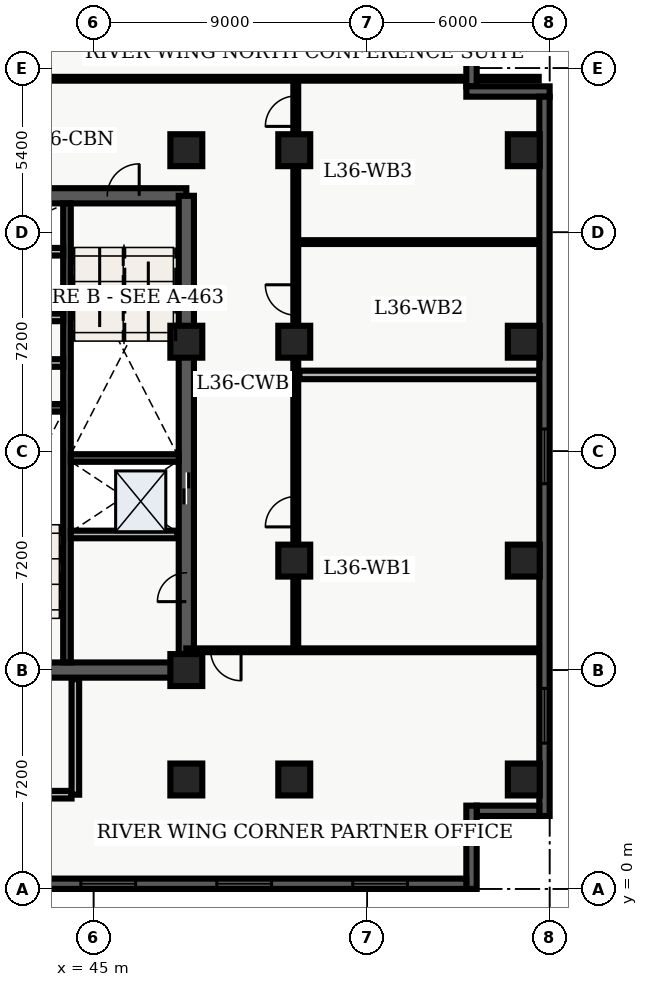
"""IFC4 building model, lengths in metres.
Left out: names, types, materials, properties, quantities, classifications, styles, units other than length and angle.
Written with IfcOpenShell. Run it as: python <this file> out.ifc"""

import sys

from ifc_helpers import new_model, entity, si_unit, converted_unit, direction, frame, origin_with_axes, origin_2d_with_axis, place, context, subcontext, project, spatial, polyline, rectangle, outline, extrude, element, fill, save


model = new_model("IFC4")
c1 = context("Model", 3, precision=1e-05, world=origin_with_axes(), true_north=direction((0.0, 1.0)))
c2 = subcontext(c1, "Body", "Model", "MODEL_VIEW")
j1 = project(units=[si_unit("LENGTHUNIT", "METRE"), converted_unit("PLANEANGLEUNIT", "DEGREE", entity("IfcPlaneAngleMeasure", 0.017), si_unit("PLANEANGLEUNIT", "RADIAN"), dimensions=[0, 0, 0, 0, 0, 0, 0])], contexts=[c1])
p1 = place(None, origin_with_axes())
s1 = spatial("IfcSite", under=j1, at=p1, CompositionType="ELEMENT")
p2 = place(p1, origin_with_axes())
s2 = spatial("IfcBuilding", under=s1, at=p2, CompositionType="ELEMENT")
p3 = place(p2, frame((0.0, 0.0, 148.5), z_axis=(0.0, 0.0, 1.0), x_axis=(1.0, 0.0, 0.0)))
s3 = spatial("IfcBuildingStorey", under=s2, at=p3, CompositionType="ELEMENT", Elevation=148.5)
p4 = place(p3, frame((40.2, 7.2, 0.0), z_axis=(0.0, 0.0, 1.0), x_axis=(1.0, 0.0, 0.0)))
e1 = element("IfcWall", 1, at=p4, inside=s3, PredefinedType="SHEAR", context=c2, shape_type="SweptSolid", body=[
    extrude(outline(polyline([(0.0, -0.25), (7.85, -0.25), (7.85, 0.25), (0.0, 0.25), (0.0, -0.25)])), origin_with_axes(), (0.0, 0.0, 1.0), 3.66),
])
p5 = place(p4, frame((2.175, 0.0, 0.0), z_axis=(0.0, 0.0, 1.0), x_axis=(1.0, 0.0, 0.0)))
e2 = element("IfcOpeningElement", 2, at=p5, cuts=e1, PredefinedType="OPENING", context=c2, shape_type="SweptSolid", body=[
    extrude(rectangle(XDim=1.05, YDim=0.52, at=origin_2d_with_axis()), origin_with_axes(), (0.0, 0.0, 1.0), 2.15),
])
p6 = place(p3, frame((40.2, 22.8, 0.0), z_axis=(0.0, 0.0, 1.0), x_axis=(1.0, 0.0, 0.0)))
e3 = element("IfcWall", 3, at=p6, inside=s3, PredefinedType="SHEAR", context=c2, shape_type="SweptSolid", body=[
    extrude(outline(polyline([(0.0, -0.25), (7.85, -0.25), (7.85, 0.25), (0.0, 0.25), (0.0, -0.25)])), origin_with_axes(), (0.0, 0.0, 1.0), 3.66),
])
p7 = place(p6, frame((5.775, 0.0, 0.0), z_axis=(0.0, 0.0, 1.0), x_axis=(1.0, 0.0, 0.0)))
e4 = element("IfcOpeningElement", 4, at=p7, cuts=e3, PredefinedType="OPENING", context=c2, shape_type="SweptSolid", body=[
    extrude(rectangle(XDim=1.05, YDim=0.52, at=origin_2d_with_axis()), origin_with_axes(), (0.0, 0.0, 1.0), 2.15),
])
p8 = place(p3, frame((48.05, 7.2, 0.0), z_axis=(0.0, 0.0, 1.0), x_axis=(0.0, 1.0, 0.0)))
e5 = element("IfcWall", 5, at=p8, inside=s3, PredefinedType="SHEAR", context=c2, shape_type="SweptSolid", body=[
    extrude(outline(polyline([(0.0, -0.25), (15.6, -0.25), (15.6, 0.25), (0.0, 0.25), (0.0, -0.25)])), origin_with_axes(), (0.0, 0.0, 1.0), 3.66),
])
p9 = place(p8, frame((5.975, 0.0, 0.0), z_axis=(0.0, 0.0, 1.0), x_axis=(1.0, 0.0, 0.0)))
e6 = element("IfcOpeningElement", 6, at=p9, cuts=e5, PredefinedType="OPENING", context=c2, shape_type="SweptSolid", body=[
    extrude(rectangle(XDim=1.05, YDim=0.52, at=origin_2d_with_axis()), origin_with_axes(), (0.0, 0.0, 1.0), 2.15),
])
p10 = place(p8, frame((2.725, 0.0, 0.0), z_axis=(0.0, 0.0, 1.0), x_axis=(1.0, 0.0, 0.0)))
e7 = element("IfcOpeningElement", 7, at=p10, cuts=e5, PredefinedType="OPENING", context=c2, shape_type="SweptSolid", body=[
    extrude(rectangle(XDim=0.95, YDim=0.52, at=origin_2d_with_axis()), origin_with_axes(), (0.0, 0.0, 1.0), 2.15),
])
p11 = place(p3, frame((44.125, 7.45, 0.0), z_axis=(0.0, 0.0, 1.0), x_axis=(0.0, 1.0, 0.0)))
e8 = element("IfcWall", 8, at=p11, inside=s3, PredefinedType="SHEAR", context=c2, shape_type="SweptSolid", body=[
    extrude(outline(polyline([(0.0, -0.125), (15.1, -0.125), (15.1, 0.125), (0.0, 0.125), (0.0, -0.125)])), origin_with_axes(), (0.0, 0.0, 1.0), 3.66),
])
for number, where, z_axis, x_axis in (
    (9, (40.45, 15.825, 0.0), (0.0, 0.0, 1.0), (1.0, 0.0, 0.0)),
    (10, (44.25, 14.175, 0.0), (0.0, 0.0, 1.0), (1.0, 0.0, 0.0)),
):
    element("IfcWall", number, at=place(p3, frame(where, z_axis=z_axis, x_axis=x_axis)), inside=s3, PredefinedType="SHEAR", context=c2, shape_type="SweptSolid", body=[
        extrude(outline(polyline([(0.0, -0.125), (3.55, -0.125), (3.55, 0.125), (0.0, 0.125), (0.0, -0.125)])), origin_with_axes(), (0.0, 0.0, 1.0), 3.66),
    ])
p12 = place(p3, frame((40.5, 17.3, 0.0), z_axis=(0.0, 0.0, 1.0), x_axis=(1.0, 0.0, 0.0)))
e11 = element("IfcWall", 11, at=p12, inside=s3, PredefinedType="SOLIDWALL", context=c2, shape_type="SweptSolid", body=[
    extrude(outline(polyline([(0.0, -0.125), (3.5, -0.125), (3.5, 0.125), (0.0, 0.125), (0.0, -0.125)])), origin_with_axes(), (0.0, 0.0, 1.0), 2.7),
])
p13 = place(p12, frame((2.4, 0.0, 0.0), z_axis=(0.0, 0.0, 1.0), x_axis=(1.0, 0.0, 0.0)))
e12 = element("IfcOpeningElement", 12, at=p13, cuts=e11, PredefinedType="OPENING", context=c2, shape_type="SweptSolid", body=[
    extrude(rectangle(XDim=0.9, YDim=0.27, at=origin_2d_with_axis()), origin_with_axes(), (0.0, 0.0, 1.0), 2.15),
])
p14 = place(p3, frame((40.5, 18.8, 0.0), z_axis=(0.0, 0.0, 1.0), x_axis=(1.0, 0.0, 0.0)))
e13 = element("IfcWall", 13, at=p14, inside=s3, PredefinedType="SOLIDWALL", context=c2, shape_type="SweptSolid", body=[
    extrude(outline(polyline([(0.0, -0.125), (3.5, -0.125), (3.5, 0.125), (0.0, 0.125), (0.0, -0.125)])), origin_with_axes(), (0.0, 0.0, 1.0), 2.7),
])
p15 = place(p3, frame((40.325, 3.1, 0.0), z_axis=(0.0, 0.0, 1.0), x_axis=(1.0, 0.0, 0.0)))
e14 = element("IfcWall", 14, at=p15, inside=s3, PredefinedType="SOLIDWALL", context=c2, shape_type="SweptSolid", body=[
    extrude(outline(polyline([(0.0, -0.125), (3.95, -0.125), (3.95, 0.125), (0.0, 0.125), (0.0, -0.125)])), origin_with_axes(), (0.0, 0.0, 1.0), 2.7),
])
p16 = place(p3, frame((44.4, 3.1, 0.0), z_axis=(0.0, 0.0, 1.0), x_axis=(0.0, 1.0, 0.0)))
e15 = element("IfcWall", 15, at=p16, inside=s3, PredefinedType="SOLIDWALL", context=c2, shape_type="SweptSolid", body=[
    extrude(outline(polyline([(0.0, -0.125), (3.8, -0.125), (3.8, 0.125), (0.0, 0.125), (0.0, -0.125)])), origin_with_axes(), (0.0, 0.0, 1.0), 2.7),
])
for number, where, z_axis, x_axis in (
    (16, (48.05, 3.6, 0.0), (0.0, 0.0, 1.0), (1.0, 0.0, 0.0)),
    (17, (48.05, 7.2, 0.0), (0.0, 0.0, 1.0), (1.0, 0.0, 0.0)),
    (18, (48.05, 18.0, 0.0), (0.0, 0.0, 1.0), (1.0, 0.0, 0.0)),
    (19, (48.05, 24.3, 0.0), (0.0, 0.0, 1.0), (1.0, 0.0, 0.0)),
    (20, (51.6, 3.6, 0.0), (0.0, 0.0, 1.0), (1.0, 0.0, 0.0)),
    (21, (51.6, 10.8, 0.0), (0.0, 0.0, 1.0), (1.0, 0.0, 0.0)),
    (22, (51.6, 18.0, 0.0), (0.0, 0.0, 1.0), (1.0, 0.0, 0.0)),
    (23, (51.6, 24.3, 0.0), (0.0, 0.0, 1.0), (1.0, 0.0, 0.0)),
    (24, (59.15, 3.6, 0.0), (0.0, 0.0, 1.0), (1.0, 0.0, 0.0)),
    (25, (59.15, 10.8, 0.0), (0.0, 0.0, 1.0), (1.0, 0.0, 0.0)),
    (26, (59.15, 18.0, 0.0), (0.0, 0.0, 1.0), (1.0, 0.0, 0.0)),
    (27, (59.15, 24.3, 0.0), (0.0, 0.0, 1.0), (1.0, 0.0, 0.0)),
):
    element("IfcColumn", number, at=place(p3, frame(where, z_axis=z_axis, x_axis=x_axis)), inside=s3, PredefinedType="COLUMN", context=c2, shape_type="SweptSolid", body=[
        extrude(rectangle(XDim=1.05, YDim=1.05, at=origin_2d_with_axis()), origin_with_axes(), (0.0, 0.0, 1.0), 3.9),
    ])
for number, where, z_axis, x_axis in (
    (28, (40.5, 20.96, 0.0), (0.0, 0.0, 1.0), (1.0, 0.0, 0.0)),
    (29, (44.25, 11.66, 0.0), (0.0, 0.0, 1.0), (1.0, 0.0, 0.0)),
):
    element("IfcWall", number, at=place(p3, frame(where, z_axis=z_axis, x_axis=x_axis)), inside=s3, PredefinedType="SOLIDWALL", context=c2, shape_type="SweptSolid", body=[
        extrude(outline(polyline([(0.0, -0.125), (3.5, -0.125), (3.5, 0.125), (0.0, 0.125), (0.0, -0.125)])), origin_with_axes(), (0.0, 0.0, 1.0), 2.7),
    ])
p17 = place(p3, frame((51.65, 7.85, 0.0), z_axis=(0.0, 0.0, 1.0), x_axis=(0.0, 1.0, 0.0)))
e30 = element("IfcWall", 30, at=p17, inside=s3, PredefinedType="PARTITIONING", context=c2, shape_type="SweptSolid", body=[
    extrude(outline(polyline([(0.0, -0.08), (18.8, -0.08), (18.8, 0.08), (0.0, 0.08), (0.0, -0.08)])), origin_with_axes(), (0.0, 0.0, 1.0), 2.7),
])
p18 = place(p17, frame((4.559, 0.0, 0.0), z_axis=(0.0, 0.0, 1.0), x_axis=(1.0, 0.0, 0.0)))
e31 = element("IfcOpeningElement", 31, at=p18, cuts=e30, PredefinedType="OPENING", context=c2, shape_type="SweptSolid", body=[
    extrude(rectangle(XDim=1.0, YDim=0.18, at=origin_2d_with_axis()), origin_with_axes(), (0.0, 0.0, 1.0), 2.15),
])
p19 = place(p17, frame((11.523, 0.0, 0.0), z_axis=(0.0, 0.0, 1.0), x_axis=(1.0, 0.0, 0.0)))
e32 = element("IfcOpeningElement", 32, at=p19, cuts=e30, PredefinedType="OPENING", context=c2, shape_type="SweptSolid", body=[
    extrude(rectangle(XDim=1.0, YDim=0.18, at=origin_2d_with_axis()), origin_with_axes(), (0.0, 0.0, 1.0), 2.15),
])
p20 = place(p17, frame((17.733, 0.0, 0.0), z_axis=(0.0, 0.0, 1.0), x_axis=(1.0, 0.0, 0.0)))
e33 = element("IfcOpeningElement", 33, at=p20, cuts=e30, PredefinedType="OPENING", context=c2, shape_type="SweptSolid", body=[
    extrude(rectangle(XDim=1.0, YDim=0.18, at=origin_2d_with_axis()), origin_with_axes(), (0.0, 0.0, 1.0), 2.15),
])
p21 = place(p3, frame((59.665, 7.85, 0.0), z_axis=(0.0, 0.0, 1.0), x_axis=(-1.0, 0.0, 0.0)))
e34 = element("IfcWall", 34, at=p21, inside=s3, PredefinedType="PARTITIONING", context=c2, shape_type="SweptSolid", body=[
    extrude(outline(polyline([(0.0, -0.062), (11.615, -0.062), (11.615, 0.062), (0.0, 0.062), (0.0, -0.062)])), origin_with_axes(), (0.0, 0.0, 1.0), 2.7),
])
p22 = place(p21, frame((10.315, 0.0, 0.0), z_axis=(0.0, 0.0, 1.0), x_axis=(1.0, 0.0, 0.0)))
e35 = element("IfcOpeningElement", 35, at=p22, cuts=e34, PredefinedType="OPENING", context=c2, shape_type="SweptSolid", body=[
    extrude(rectangle(XDim=1.0, YDim=0.145, at=origin_2d_with_axis()), origin_with_axes(), (0.0, 0.0, 1.0), 2.15),
])
p23 = place(p3, frame((38.735, 26.65, 0.0), z_axis=(0.0, 0.0, 1.0), x_axis=(1.0, 0.0, 0.0)))
e36 = element("IfcWall", 36, at=p23, inside=s3, PredefinedType="PARTITIONING", context=c2, shape_type="SweptSolid", body=[
    extrude(outline(polyline([(0.0, -0.062), (20.905, -0.062), (20.905, 0.062), (0.0, 0.062), (0.0, -0.062)])), origin_with_axes(), (0.0, 0.0, 1.0), 2.7),
])
p24 = place(p23, frame((4.265, 0.0, 0.0), z_axis=(0.0, 0.0, 1.0), x_axis=(1.0, 0.0, 0.0)))
e37 = element("IfcOpeningElement", 37, at=p24, cuts=e36, PredefinedType="OPENING", context=c2, shape_type="SweptSolid", body=[
    extrude(rectangle(XDim=1.0, YDim=0.145, at=origin_2d_with_axis()), origin_with_axes(), (0.0, 0.0, 1.0), 2.15),
])
p25 = place(p3, frame((51.77, 16.908, 0.0), z_axis=(0.0, 0.0, 1.0), x_axis=(1.0, 0.0, 0.0)))
e38 = element("IfcWall", 38, at=p25, inside=s3, PredefinedType="PARTITIONING", context=c2, shape_type="SweptSolid", body=[
    extrude(outline(polyline([(0.0, -0.14), (7.895, -0.14), (7.895, 0.14), (0.0, 0.14), (0.0, -0.14)])), origin_with_axes(), (0.0, 0.0, 1.0), 2.7),
])
p26 = place(p3, frame((51.77, 21.277, 0.0), z_axis=(0.0, 0.0, 1.0), x_axis=(1.0, 0.0, 0.0)))
e39 = element("IfcWall", 39, at=p26, inside=s3, PredefinedType="PARTITIONING", context=c2, shape_type="SweptSolid", body=[
    extrude(outline(polyline([(0.0, -0.062), (7.895, -0.062), (7.895, 0.062), (0.0, 0.062), (0.0, -0.062)])), origin_with_axes(), (0.0, 0.0, 1.0), 2.7),
])
p27 = place(p3, frame((57.43, 28.46, 0.0), z_axis=(0.0, 0.0, 1.0), x_axis=(0.0, -1.0, 0.0)))
e40 = element("IfcWall", 40, at=p27, inside=s3, PredefinedType="SOLIDWALL", context=c2, shape_type="SweptSolid", body=[
    extrude(outline(polyline([(0.0, -0.17), (2.06, -0.17), (2.06, 0.17), (0.0, 0.17), (0.0, -0.17)])), origin_with_axes(), (0.0, 0.0, 1.0), 3.66),
])
p28 = place(p3, frame((57.26, 26.23, 0.0), z_axis=(0.0, 0.0, 1.0), x_axis=(1.0, 0.0, 0.0)))
e41 = element("IfcWall", 41, at=p28, inside=s3, PredefinedType="SOLIDWALL", context=c2, shape_type="SweptSolid", body=[
    extrude(outline(polyline([(0.0, -0.17), (2.74, -0.17), (2.74, 0.17), (0.0, 0.17), (0.0, -0.17)])), origin_with_axes(), (0.0, 0.0, 1.0), 3.66),
])
p29 = place(p3, frame((59.83, 26.06, 0.0), z_axis=(0.0, 0.0, 1.0), x_axis=(0.0, -1.0, 0.0)))
e42 = element("IfcWall", 42, at=p29, inside=s3, PredefinedType="SOLIDWALL", context=c2, shape_type="SweptSolid", body=[
    extrude(outline(polyline([(0.0, -0.17), (23.66, -0.17), (23.66, 0.17), (0.0, 0.17), (0.0, -0.17)])), origin_with_axes(), (0.0, 0.0, 1.0), 3.66),
])
p30 = place(p29, frame((11.83, 0.0, 0.45), z_axis=(0.0, 0.0, 1.0), x_axis=(1.0, 0.0, 0.0)))
e43 = element("IfcOpeningElement", 43, at=p30, cuts=e42, PredefinedType="OPENING", context=c2, shape_type="SweptSolid", body=[
    extrude(rectangle(XDim=1.8, YDim=0.36, at=origin_2d_with_axis()), origin_with_axes(), (0.0, 0.0, 1.0), 2.1),
])
p31 = place(p29, frame((20.364, 0.0, 0.45), z_axis=(0.0, 0.0, 1.0), x_axis=(1.0, 0.0, 0.0)))
e44 = element("IfcOpeningElement", 44, at=p31, cuts=e42, PredefinedType="OPENING", context=c2, shape_type="SweptSolid", body=[
    extrude(rectangle(XDim=1.8, YDim=0.36, at=origin_2d_with_axis()), origin_with_axes(), (0.0, 0.0, 1.0), 2.1),
])
p32 = place(p3, frame((59.66, 2.57, 0.0), z_axis=(0.0, 0.0, 1.0), x_axis=(-1.0, 0.0, 0.0)))
e45 = element("IfcWall", 45, at=p32, inside=s3, PredefinedType="SOLIDWALL", context=c2, shape_type="SweptSolid", body=[
    extrude(outline(polyline([(0.0, -0.17), (2.06, -0.17), (2.06, 0.17), (0.0, 0.17), (0.0, -0.17)])), origin_with_axes(), (0.0, 0.0, 1.0), 3.66),
])
p33 = place(p3, frame((57.43, 2.74, 0.0), z_axis=(0.0, 0.0, 1.0), x_axis=(0.0, -1.0, 0.0)))
e46 = element("IfcWall", 46, at=p33, inside=s3, PredefinedType="SOLIDWALL", context=c2, shape_type="SweptSolid", body=[
    extrude(outline(polyline([(0.0, -0.17), (2.74, -0.17), (2.74, 0.17), (0.0, 0.17), (0.0, -0.17)])), origin_with_axes(), (0.0, 0.0, 1.0), 3.66),
])
p34 = place(p3, frame((57.26, 0.17, 0.0), z_axis=(0.0, 0.0, 1.0), x_axis=(-1.0, 0.0, 0.0)))
e47 = element("IfcWall", 47, at=p34, inside=s3, PredefinedType="SOLIDWALL", context=c2, shape_type="SweptSolid", body=[
    extrude(outline(polyline([(0.0, -0.17), (54.86, -0.17), (54.86, 0.17), (0.0, 0.17), (0.0, -0.17)])), origin_with_axes(), (0.0, 0.0, 1.0), 3.66),
])
p35 = place(p34, frame((2.836, 0.0, 0.45), z_axis=(0.0, 0.0, 1.0), x_axis=(1.0, 0.0, 0.0)))
e48 = element("IfcOpeningElement", 48, at=p35, cuts=e47, PredefinedType="OPENING", context=c2, shape_type="SweptSolid", body=[
    extrude(rectangle(XDim=1.8, YDim=0.36, at=origin_2d_with_axis()), origin_with_axes(), (0.0, 0.0, 1.0), 2.1),
])
p36 = place(p34, frame((7.307, 0.0, 0.45), z_axis=(0.0, 0.0, 1.0), x_axis=(1.0, 0.0, 0.0)))
e49 = element("IfcOpeningElement", 49, at=p36, cuts=e47, PredefinedType="OPENING", context=c2, shape_type="SweptSolid", body=[
    extrude(rectangle(XDim=1.8, YDim=0.36, at=origin_2d_with_axis()), origin_with_axes(), (0.0, 0.0, 1.0), 2.1),
])
p37 = place(p34, frame((11.779, 0.0, 0.45), z_axis=(0.0, 0.0, 1.0), x_axis=(1.0, 0.0, 0.0)))
e50 = element("IfcOpeningElement", 50, at=p37, cuts=e47, PredefinedType="OPENING", context=c2, shape_type="SweptSolid", body=[
    extrude(rectangle(XDim=1.8, YDim=0.36, at=origin_2d_with_axis()), origin_with_axes(), (0.0, 0.0, 1.0), 2.1),
])
p38 = place(p34, frame((16.251, 0.0, 0.45), z_axis=(0.0, 0.0, 1.0), x_axis=(1.0, 0.0, 0.0)))
e51 = element("IfcOpeningElement", 51, at=p38, cuts=e47, PredefinedType="OPENING", context=c2, shape_type="SweptSolid", body=[
    extrude(rectangle(XDim=1.8, YDim=0.36, at=origin_2d_with_axis()), origin_with_axes(), (0.0, 0.0, 1.0), 2.1),
])
p39 = place(p34, frame((20.723, 0.0, 0.45), z_axis=(0.0, 0.0, 1.0), x_axis=(1.0, 0.0, 0.0)))
e52 = element("IfcOpeningElement", 52, at=p39, cuts=e47, PredefinedType="OPENING", context=c2, shape_type="SweptSolid", body=[
    extrude(rectangle(XDim=1.8, YDim=0.36, at=origin_2d_with_axis()), origin_with_axes(), (0.0, 0.0, 1.0), 2.1),
])
p40 = place(p34, frame((25.194, 0.0, 0.45), z_axis=(0.0, 0.0, 1.0), x_axis=(1.0, 0.0, 0.0)))
e53 = element("IfcOpeningElement", 53, at=p40, cuts=e47, PredefinedType="OPENING", context=c2, shape_type="SweptSolid", body=[
    extrude(rectangle(XDim=1.8, YDim=0.36, at=origin_2d_with_axis()), origin_with_axes(), (0.0, 0.0, 1.0), 2.1),
])
p41 = place(p34, frame((29.666, 0.0, 0.45), z_axis=(0.0, 0.0, 1.0), x_axis=(1.0, 0.0, 0.0)))
e54 = element("IfcOpeningElement", 54, at=p41, cuts=e47, PredefinedType="OPENING", context=c2, shape_type="SweptSolid", body=[
    extrude(rectangle(XDim=1.8, YDim=0.36, at=origin_2d_with_axis()), origin_with_axes(), (0.0, 0.0, 1.0), 2.1),
])
p42 = place(p34, frame((34.138, 0.0, 0.45), z_axis=(0.0, 0.0, 1.0), x_axis=(1.0, 0.0, 0.0)))
e55 = element("IfcOpeningElement", 55, at=p42, cuts=e47, PredefinedType="OPENING", context=c2, shape_type="SweptSolid", body=[
    extrude(rectangle(XDim=1.8, YDim=0.36, at=origin_2d_with_axis()), origin_with_axes(), (0.0, 0.0, 1.0), 2.1),
])
p43 = place(p34, frame((38.609, 0.0, 0.45), z_axis=(0.0, 0.0, 1.0), x_axis=(1.0, 0.0, 0.0)))
e56 = element("IfcOpeningElement", 56, at=p43, cuts=e47, PredefinedType="OPENING", context=c2, shape_type="SweptSolid", body=[
    extrude(rectangle(XDim=1.8, YDim=0.36, at=origin_2d_with_axis()), origin_with_axes(), (0.0, 0.0, 1.0), 2.1),
])
p44 = place(p34, frame((43.081, 0.0, 0.45), z_axis=(0.0, 0.0, 1.0), x_axis=(1.0, 0.0, 0.0)))
e57 = element("IfcOpeningElement", 57, at=p44, cuts=e47, PredefinedType="OPENING", context=c2, shape_type="SweptSolid", body=[
    extrude(rectangle(XDim=1.8, YDim=0.36, at=origin_2d_with_axis()), origin_with_axes(), (0.0, 0.0, 1.0), 2.1),
])
p45 = place(p34, frame((48.403, 0.0, 0.45), z_axis=(0.0, 0.0, 1.0), x_axis=(1.0, 0.0, 0.0)))
e58 = element("IfcOpeningElement", 58, at=p45, cuts=e47, PredefinedType="OPENING", context=c2, shape_type="SweptSolid", body=[
    extrude(rectangle(XDim=1.8, YDim=0.36, at=origin_2d_with_axis()), origin_with_axes(), (0.0, 0.0, 1.0), 2.1),
])
p46 = place(p34, frame((52.024, 0.0, 0.45), z_axis=(0.0, 0.0, 1.0), x_axis=(1.0, 0.0, 0.0)))
e59 = element("IfcOpeningElement", 59, at=p46, cuts=e47, PredefinedType="OPENING", context=c2, shape_type="SweptSolid", body=[
    extrude(rectangle(XDim=1.8, YDim=0.36, at=origin_2d_with_axis()), origin_with_axes(), (0.0, 0.0, 1.0), 2.1),
])
p47 = place(p8, frame((5.975, 0.0, 0.0), z_axis=(0.0, 0.0, 1.0), x_axis=(1.0, 0.0, 0.0)))
e60 = element("IfcDoor", 60, at=p47, inside=s3, OperationType="SLIDING_TO_LEFT", PredefinedType="DOOR", context=c2, shape_type="SweptSolid", body=[
    extrude(rectangle(XDim=1.05, YDim=0.09, at=origin_2d_with_axis()), origin_with_axes(), (0.0, 0.0, 1.0), 2.15),
])
fill(e6, e60)
p48 = place(p6, frame((5.775, 0.0, 0.0), z_axis=(0.0, 0.0, 1.0), x_axis=(1.0, 0.0, 0.0)))
e61 = element("IfcDoor", 61, at=p48, inside=s3, OperationType="SINGLE_SWING_RIGHT", PredefinedType="DOOR", context=c2, shape_type="SweptSolid", body=[
    extrude(rectangle(XDim=1.05, YDim=0.09, at=origin_2d_with_axis()), origin_with_axes(), (0.0, 0.0, 1.0), 2.15),
])
fill(e4, e61)
p49 = place(p8, frame((2.725, 0.0, 0.0), z_axis=(0.0, 0.0, 1.0), x_axis=(1.0, 0.0, 0.0)))
e62 = element("IfcDoor", 62, at=p49, inside=s3, OperationType="SINGLE_SWING_LEFT", PredefinedType="DOOR", context=c2, shape_type="SweptSolid", body=[
    extrude(rectangle(XDim=0.95, YDim=0.09, at=origin_2d_with_axis()), origin_with_axes(), (0.0, 0.0, 1.0), 2.15),
])
fill(e7, e62)
p50 = place(p21, frame((10.315, 0.0, 0.0), z_axis=(0.0, 0.0, 1.0), x_axis=(1.0, 0.0, 0.0)))
e63 = element("IfcDoor", 63, at=p50, inside=s3, OperationType="SINGLE_SWING_LEFT", PredefinedType="DOOR", context=c2, shape_type="SweptSolid", body=[
    extrude(rectangle(XDim=1.0, YDim=0.075, at=origin_2d_with_axis()), origin_with_axes(), (0.0, 0.0, 1.0), 2.15),
])
fill(e35, e63)
p51 = place(p17, frame((4.559, 0.0, 0.0), z_axis=(0.0, 0.0, 1.0), x_axis=(1.0, 0.0, 0.0)))
e64 = element("IfcDoor", 64, at=p51, inside=s3, OperationType="SINGLE_SWING_LEFT", PredefinedType="DOOR", context=c2, shape_type="SweptSolid", body=[
    extrude(rectangle(XDim=1.0, YDim=0.09, at=origin_2d_with_axis()), origin_with_axes(), (0.0, 0.0, 1.0), 2.15),
])
fill(e31, e64)
p52 = place(p17, frame((11.523, 0.0, 0.0), z_axis=(0.0, 0.0, 1.0), x_axis=(1.0, 0.0, 0.0)))
e65 = element("IfcDoor", 65, at=p52, inside=s3, OperationType="SINGLE_SWING_RIGHT", PredefinedType="DOOR", context=c2, shape_type="SweptSolid", body=[
    extrude(rectangle(XDim=1.0, YDim=0.09, at=origin_2d_with_axis()), origin_with_axes(), (0.0, 0.0, 1.0), 2.15),
])
fill(e32, e65)
p53 = place(p17, frame((17.733, 0.0, 0.0), z_axis=(0.0, 0.0, 1.0), x_axis=(1.0, 0.0, 0.0)))
e66 = element("IfcDoor", 66, at=p53, inside=s3, OperationType="SINGLE_SWING_LEFT", PredefinedType="DOOR", context=c2, shape_type="SweptSolid", body=[
    extrude(rectangle(XDim=1.0, YDim=0.09, at=origin_2d_with_axis()), origin_with_axes(), (0.0, 0.0, 1.0), 2.15),
])
fill(e33, e66)
p54 = place(p29, frame((11.83, 0.0, 0.45), z_axis=(0.0, 0.0, 1.0), x_axis=(1.0, 0.0, 0.0)))
e67 = element("IfcWindow", 67, at=p54, inside=s3, PredefinedType="WINDOW", context=c2, shape_type="SweptSolid", body=[
    extrude(rectangle(XDim=1.8, YDim=0.09, at=origin_2d_with_axis()), origin_with_axes(), (0.0, 0.0, 1.0), 2.1),
])
fill(e43, e67)
p55 = place(p29, frame((20.364, 0.0, 0.45), z_axis=(0.0, 0.0, 1.0), x_axis=(1.0, 0.0, 0.0)))
e68 = element("IfcWindow", 68, at=p55, inside=s3, PredefinedType="WINDOW", context=c2, shape_type="SweptSolid", body=[
    extrude(rectangle(XDim=1.8, YDim=0.09, at=origin_2d_with_axis()), origin_with_axes(), (0.0, 0.0, 1.0), 2.1),
])
fill(e44, e68)
p56 = place(p34, frame((2.836, 0.0, 0.45), z_axis=(0.0, 0.0, 1.0), x_axis=(1.0, 0.0, 0.0)))
e69 = element("IfcWindow", 69, at=p56, inside=s3, PredefinedType="WINDOW", context=c2, shape_type="SweptSolid", body=[
    extrude(rectangle(XDim=1.8, YDim=0.09, at=origin_2d_with_axis()), origin_with_axes(), (0.0, 0.0, 1.0), 2.1),
])
fill(e48, e69)
p57 = place(p34, frame((7.307, 0.0, 0.45), z_axis=(0.0, 0.0, 1.0), x_axis=(1.0, 0.0, 0.0)))
e70 = element("IfcWindow", 70, at=p57, inside=s3, PredefinedType="WINDOW", context=c2, shape_type="SweptSolid", body=[
    extrude(rectangle(XDim=1.8, YDim=0.09, at=origin_2d_with_axis()), origin_with_axes(), (0.0, 0.0, 1.0), 2.1),
])
fill(e49, e70)
p58 = place(p34, frame((11.779, 0.0, 0.45), z_axis=(0.0, 0.0, 1.0), x_axis=(1.0, 0.0, 0.0)))
e71 = element("IfcWindow", 71, at=p58, inside=s3, PredefinedType="WINDOW", context=c2, shape_type="SweptSolid", body=[
    extrude(rectangle(XDim=1.8, YDim=0.09, at=origin_2d_with_axis()), origin_with_axes(), (0.0, 0.0, 1.0), 2.1),
])
fill(e50, e71)
save(model, sys.argv[1])
